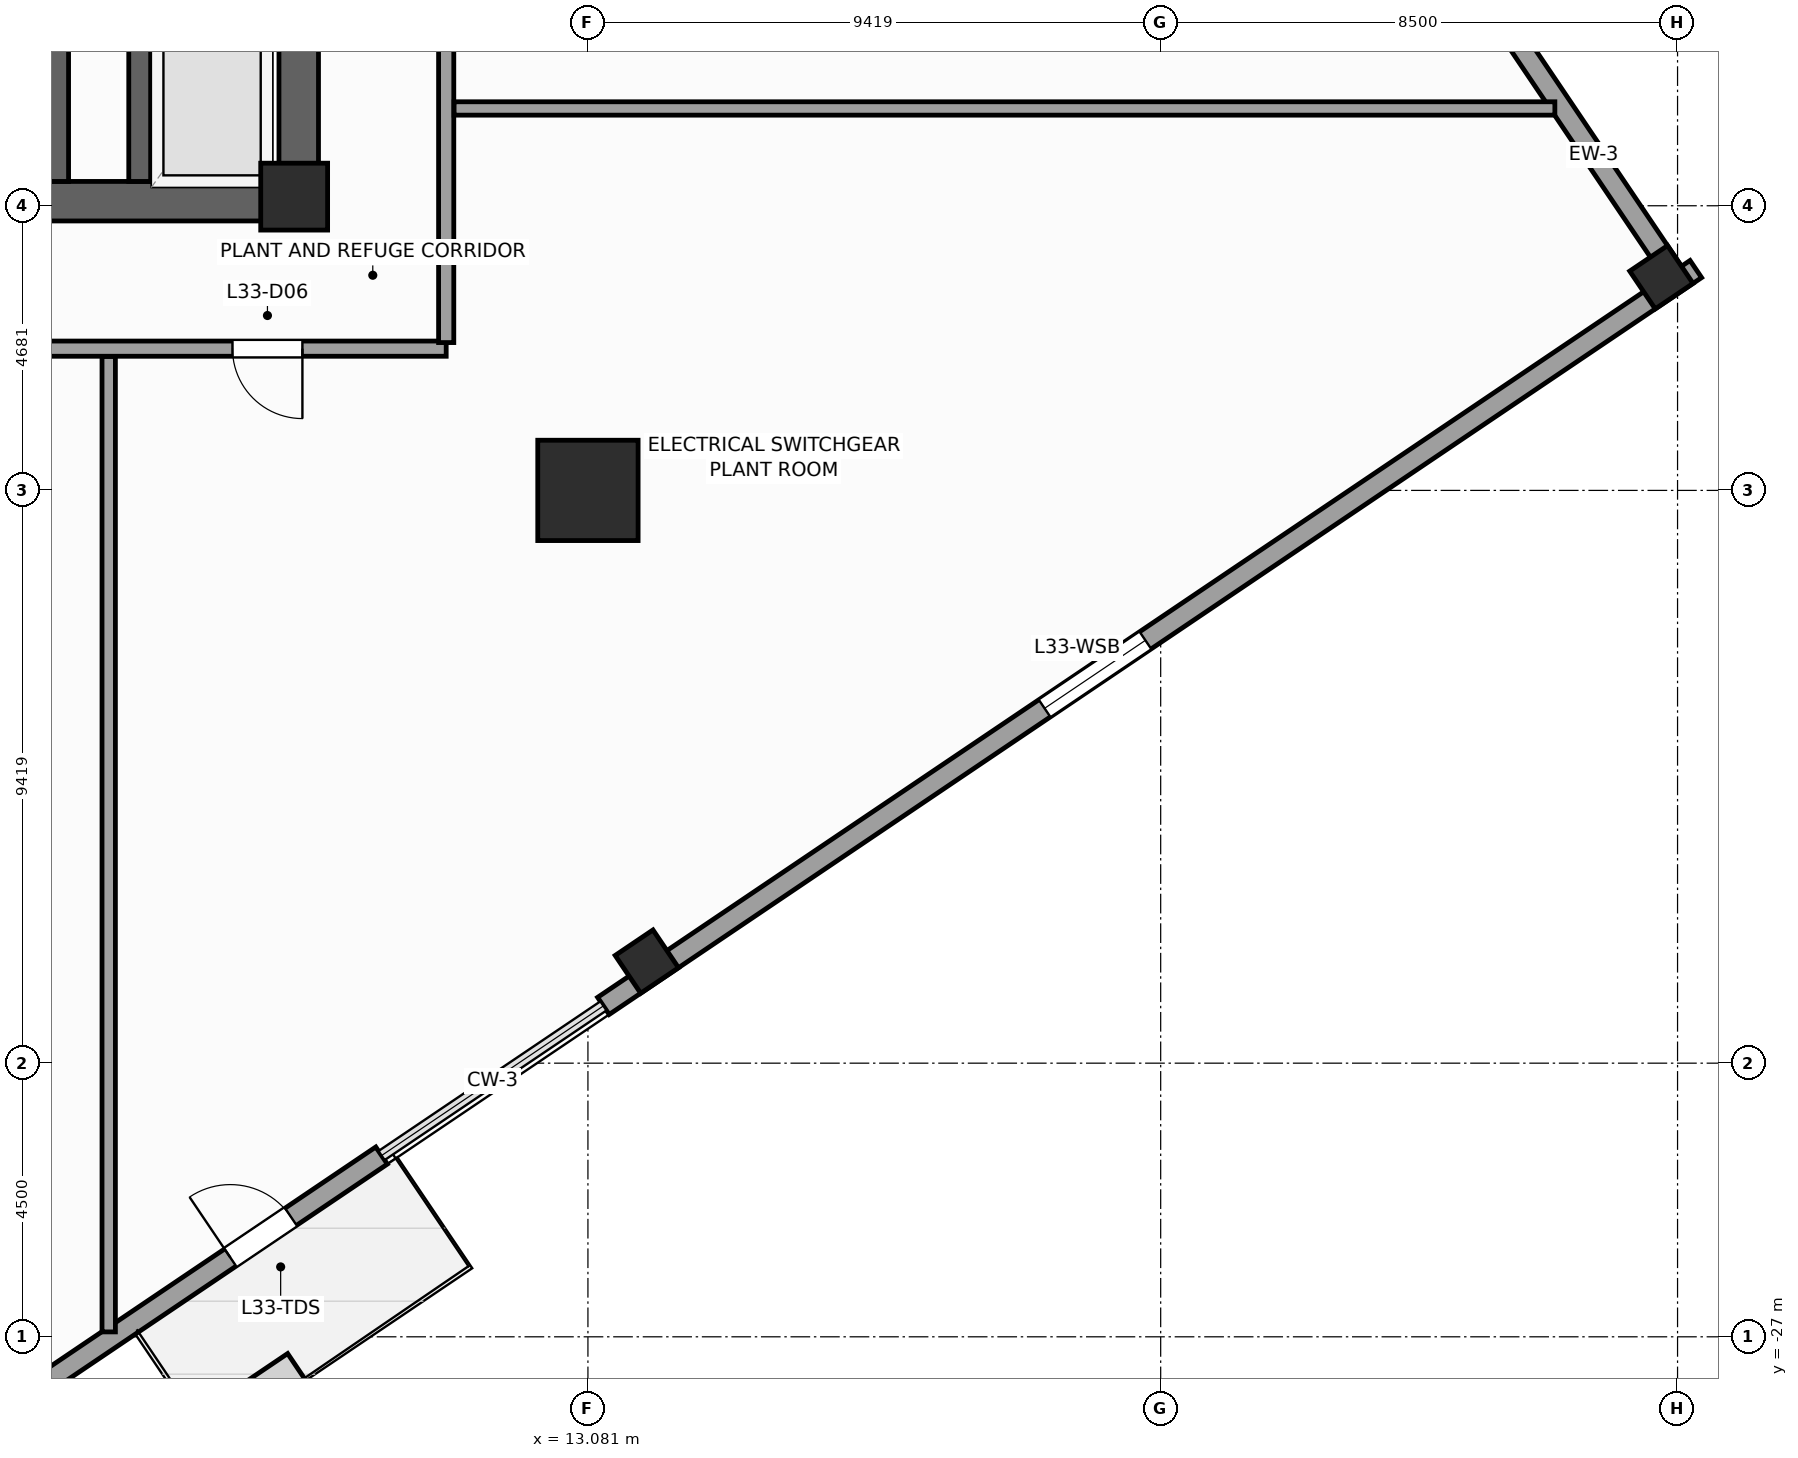
"""IFC4 building model, lengths in metres.
Left out: names, types, materials, properties, quantities, classifications, styles, units other than length and angle.
Written with IfcOpenShell. Run it as: python <this file> out.ifc"""

import sys

from ifc_helpers import new_model, si_unit, direction, frame, frame_2d, origin, origin_2d, place, context, subcontext, project, spatial, rectangle, extrude, source, transform, mapped, element, fill, save


model = new_model("IFC4")
c1 = context("Model", 3, precision=1e-05, world=origin(), true_north=direction((0.0, 1.0)))
c2 = subcontext(c1, "Body", "Model", "MODEL_VIEW")
j1 = project(units=[si_unit("LENGTHUNIT", "METRE"), si_unit("PLANEANGLEUNIT", "RADIAN")], contexts=[c1])
p1 = place(None, origin())
s1 = spatial("IfcSite", under=j1, at=p1, CompositionType="ELEMENT")
p2 = place(p1, origin())
s2 = spatial("IfcBuilding", under=s1, at=p2, CompositionType="ELEMENT")
p3 = place(p2, frame((0.0, 0.0, 139.2)))
s3 = spatial("IfcBuildingStorey", under=s2, at=p3, CompositionType="ELEMENT", Elevation=139.2)
p4 = place(p3, frame((-8.65, -8.325, 0.0), z_axis=(0.0, 0.0, 1.0), x_axis=(1.0, 0.0, 0.0)))
e1 = element("IfcWall", 1, at=p4, inside=s3, PredefinedType="SHEAR", context=c2, shape_type="SweptSolid", body=[
    extrude(rectangle(XDim=17.3, YDim=0.65, at=frame_2d((8.65, 0.0))), origin(), (0.0, 0.0, 1.0), 5.2),
])
p5 = place(p4, frame((8.0, 0.0, 0.0)))
e2 = element("IfcOpeningElement", 2, at=p5, cuts=e1, PredefinedType="OPENING", context=c2, shape_type="SweptSolid", body=[
    extrude(rectangle(XDim=1.3, YDim=2.2, at=frame_2d((0.65, 1.1))), frame((0.0, 0.335, 0.0), z_axis=(0.0, -1.0, 0.0), x_axis=(1.0, 0.0, 0.0)), (0.0, 0.0, 1.0), 0.67),
])
p6 = place(p3, frame((8.325, -8.0, 0.0), z_axis=(0.0, 0.0, 1.0), x_axis=(0.0, 1.0, 0.0)))
e3 = element("IfcWall", 3, at=p6, inside=s3, PredefinedType="SHEAR", context=c2, shape_type="SweptSolid", body=[
    extrude(rectangle(XDim=16.0, YDim=0.65, at=frame_2d((8.0, 0.0))), origin(), (0.0, 0.0, 1.0), 5.2),
])
p7 = place(p6, frame((4.69, 0.0, 0.0)))
e4 = element("IfcOpeningElement", 4, at=p7, cuts=e3, PredefinedType="OPENING", context=c2, shape_type="SweptSolid", body=[
    extrude(rectangle(XDim=1.3, YDim=2.2, at=frame_2d((0.65, 1.1))), frame((0.0, 0.335, 0.0), z_axis=(0.0, -1.0, 0.0), x_axis=(1.0, 0.0, 0.0)), (0.0, 0.0, 1.0), 0.67),
])
p8 = place(p3, frame((4.36, -8.0, 0.0), z_axis=(0.0, 0.0, 1.0), x_axis=(0.0, 1.0, 0.0)))
e5 = element("IfcWall", 5, at=p8, inside=s3, PredefinedType="SHEAR", context=c2, shape_type="SweptSolid", body=[
    extrude(rectangle(XDim=16.0, YDim=0.36, at=frame_2d((8.0, 0.0))), origin(), (0.0, 0.0, 1.0), 5.2),
])
p9 = place(p3, frame((5.71, -8.0, 0.0), z_axis=(0.0, 0.0, 1.0), x_axis=(0.0, 1.0, 0.0)))
e6 = element("IfcWall", 6, at=p9, inside=s3, PredefinedType="SHEAR", context=c2, shape_type="SweptSolid", body=[
    extrude(rectangle(XDim=2.54, YDim=0.36, at=frame_2d((1.27, 0.0))), origin(), (0.0, 0.0, 1.0), 5.2),
])
m1 = source(origin(), c2, "Body", "SweptSolid", [
    extrude(rectangle(XDim=1.1, YDim=1.1, at=origin_2d()), origin(), (0.0, 0.0, 1.0), 5.2),
])
p10 = place(p3, frame((8.25, -8.25, 0.0), z_axis=(0.0, 0.0, 1.0), x_axis=(1.0, 0.0, 0.0)))
e7 = element("IfcColumn", 7, at=p10, inside=s3, PredefinedType="PILASTER", context=c2, shape_type="MappedRepresentation", body=[
    mapped(m1, transform((0.0, 0.0, 0.0), scale=1.0)),
])
m2 = source(origin(), c2, "Body", "SweptSolid", [
    extrude(rectangle(XDim=1.65, YDim=1.65, at=origin_2d()), origin(), (0.0, 0.0, 1.0), 5.2),
])
p11 = place(p3, frame((13.081, -13.081, 0.0), z_axis=(0.0, 0.0, 1.0), x_axis=(1.0, 0.0, 0.0)))
e8 = element("IfcColumn", 8, at=p11, inside=s3, PredefinedType="COLUMN", context=c2, shape_type="MappedRepresentation", body=[
    mapped(m2, transform((0.0, 0.0, 0.0), scale=1.0)),
])
m3 = source(origin(), c2, "Body", "SweptSolid", [
    extrude(rectangle(XDim=0.75, YDim=0.75, at=origin_2d()), origin(), (0.0, 0.0, 1.0), 5.2),
])
for number, where, z_axis, x_axis in (
    (9, (14.05, -20.83, 0.0), (0.0, 0.0, 1.0), (0.829, 0.559, 0.0)),
    (10, (30.734, -9.576, 0.0), (0.0, 0.0, 1.0), (0.829, 0.559, 0.0)),
):
    element("IfcColumn", number, at=place(p3, frame(where, z_axis=z_axis, x_axis=x_axis)), inside=s3, PredefinedType="COLUMN", context=c2, shape_type="MappedRepresentation", body=[
        mapped(m3, transform((0.0, 0.0, 0.0), scale=1.0)),
    ])
p12 = place(p3, frame((31.019, -9.631, 0.0), z_axis=(0.0, 0.0, 1.0), x_axis=(-0.559210350234, 0.829025804298, 0.0)))
e11 = element("IfcWall", 11, at=p12, inside=s3, PredefinedType="STANDARD", context=c2, shape_type="SweptSolid", body=[
    extrude(rectangle(XDim=5.0, YDim=0.34, at=frame_2d((2.5, 0.0))), origin(), (0.0, 0.0, 1.0), 4.94),
])
p13 = place(p3, frame((-2.972, -32.558, 0.0), z_axis=(0.0, 0.0, 1.0), x_axis=(0.82903231094, 0.559200704056, 0.0)))
e12 = element("IfcWall", 12, at=p13, inside=s3, PredefinedType="STANDARD", context=c2, shape_type="SweptSolid", body=[
    extrude(rectangle(XDim=15.27, YDim=0.34, at=frame_2d((7.635, 0.0))), origin(), (0.0, 0.0, 1.0), 4.34),
])
p14 = place(p13, frame((12.27, 0.0, 0.0)))
e13 = element("IfcOpeningElement", 13, at=p14, cuts=e12, PredefinedType="OPENING", context=c2, shape_type="SweptSolid", body=[
    extrude(rectangle(XDim=1.2, YDim=2.3, at=frame_2d((0.6, 1.15))), frame((0.0, 0.18, 0.0), z_axis=(0.0, -1.0, 0.0), x_axis=(1.0, 0.0, 0.0)), (0.0, 0.0, 1.0), 0.36),
])
p15 = place(p3, frame((13.335, -21.559, 0.0), z_axis=(0.0, 0.0, 1.0), x_axis=(0.829039576702, 0.559189932189, 0.0)))
e14 = element("IfcWall", 14, at=p15, inside=s3, PredefinedType="STANDARD", context=c2, shape_type="SweptSolid", body=[
    extrude(rectangle(XDim=21.67, YDim=0.34, at=frame_2d((10.835, 0.0))), origin(), (0.0, 0.0, 1.0), 4.24),
])
p16 = place(p15, frame((8.751, 0.0, 0.65)))
e15 = element("IfcOpeningElement", 15, at=p16, cuts=e14, PredefinedType="OPENING", context=c2, shape_type="SweptSolid", body=[
    extrude(rectangle(XDim=2.0, YDim=1.45, at=frame_2d((1.0, 0.725))), frame((0.0, 0.18, 0.0), z_axis=(0.0, -1.0, 0.0), x_axis=(1.0, 0.0, 0.0)), (0.0, 0.0, 1.0), 0.36),
])
p17 = place(p3, frame((-10.75, -10.75, 0.0), z_axis=(0.0, 0.0, 1.0), x_axis=(1.0, 0.0, 0.0)))
e16 = element("IfcWall", 16, at=p17, inside=s3, PredefinedType="PARTITIONING", context=c2, shape_type="SweptSolid", body=[
    extrude(rectangle(XDim=21.5, YDim=0.25, at=frame_2d((10.75, 0.0))), origin(), (0.0, 0.0, 1.0), 4.94),
])
p18 = place(p17, frame((17.986, 0.0, 0.0)))
e17 = element("IfcOpeningElement", 17, at=p18, cuts=e16, PredefinedType="OPENING", context=c2, shape_type="SweptSolid", body=[
    extrude(rectangle(XDim=1.15, YDim=2.25, at=frame_2d((0.575, 1.125))), frame((0.0, 0.135, 0.0), z_axis=(0.0, -1.0, 0.0), x_axis=(1.0, 0.0, 0.0)), (0.0, 0.0, 1.0), 0.27),
])
p19 = place(p17, frame((12.775, 0.0, 0.0)))
e18 = element("IfcOpeningElement", 18, at=p19, cuts=e16, PredefinedType="OPENING", context=c2, shape_type="SweptSolid", body=[
    extrude(rectangle(XDim=1.15, YDim=2.25, at=frame_2d((0.575, 1.125))), frame((0.0, 0.135, 0.0), z_axis=(0.0, -1.0, 0.0), x_axis=(1.0, 0.0, 0.0)), (0.0, 0.0, 1.0), 0.27),
])
p20 = place(p17, frame((7.575, 0.0, 0.0)))
e19 = element("IfcOpeningElement", 19, at=p20, cuts=e16, PredefinedType="OPENING", context=c2, shape_type="SweptSolid", body=[
    extrude(rectangle(XDim=1.15, YDim=2.25, at=frame_2d((0.575, 1.125))), frame((0.0, 0.135, 0.0), z_axis=(0.0, -1.0, 0.0), x_axis=(1.0, 0.0, 0.0)), (0.0, 0.0, 1.0), 0.27),
])
p21 = place(p17, frame((2.365, 0.0, 0.0)))
e20 = element("IfcOpeningElement", 20, at=p21, cuts=e16, PredefinedType="OPENING", context=c2, shape_type="SweptSolid", body=[
    extrude(rectangle(XDim=1.15, YDim=2.25, at=frame_2d((0.575, 1.125))), frame((0.0, 0.135, 0.0), z_axis=(0.0, -1.0, 0.0), x_axis=(1.0, 0.0, 0.0)), (0.0, 0.0, 1.0), 0.27),
])
p22 = place(p3, frame((10.75, -10.65, 0.0), z_axis=(0.0, 0.0, 1.0), x_axis=(0.0, 1.0, 0.0)))
e21 = element("IfcWall", 21, at=p22, inside=s3, PredefinedType="PARTITIONING", context=c2, shape_type="SweptSolid", body=[
    extrude(rectangle(XDim=21.3, YDim=0.25, at=frame_2d((10.65, 0.0))), origin(), (0.0, 0.0, 1.0), 4.94),
])
p23 = place(p22, frame((11.35, 0.0, 0.0)))
e22 = element("IfcOpeningElement", 22, at=p23, cuts=e21, PredefinedType="OPENING", context=c2, shape_type="SweptSolid", body=[
    extrude(rectangle(XDim=1.15, YDim=2.25, at=frame_2d((0.575, 1.125))), frame((0.0, 0.135, 0.0), z_axis=(0.0, -1.0, 0.0), x_axis=(1.0, 0.0, 0.0)), (0.0, 0.0, 1.0), 0.27),
])
p24 = place(p3, frame((10.88, -6.8, 0.0), z_axis=(0.0, 0.0, 1.0), x_axis=(1.0, 0.0, 0.0)))
e23 = element("IfcWall", 23, at=p24, inside=s3, PredefinedType="PARTITIONING", context=c2, shape_type="SweptSolid", body=[
    extrude(rectangle(XDim=18.103, YDim=0.22, at=frame_2d((9.051, 0.0))), origin(), (0.0, 0.0, 1.0), 4.94),
])
p25 = place(p3, frame((5.2, -10.88, 0.0), z_axis=(0.0, 0.0, 1.0), x_axis=(0.0, -1.0, 0.0)))
e24 = element("IfcWall", 24, at=p25, inside=s3, PredefinedType="PARTITIONING", context=c2, shape_type="SweptSolid", body=[
    extrude(rectangle(XDim=16.04, YDim=0.22, at=frame_2d((8.02, 0.0))), origin(), (0.0, 0.0, 1.0), 4.94),
])
m4 = source(origin(), c2, "Body", "SweptSolid", [
    extrude(rectangle(XDim=2.0, YDim=1.45, at=frame_2d((1.0, 0.725))), frame((0.0, 0.03, 0.0), z_axis=(0.0, -1.0, 0.0), x_axis=(1.0, 0.0, 0.0)), (0.0, 0.0, 1.0), 0.06),
])
p26 = place(p16, origin())
e25 = element("IfcWindow", 25, at=p26, inside=s3, PartitioningType="SINGLE_PANEL", PredefinedType="WINDOW", context=c2, shape_type="MappedRepresentation", body=[
    mapped(m4, transform((0.0, 0.0, 0.0), scale=1.0)),
])
fill(e15, e25)
m5 = source(origin(), c2, "Body", "SweptSolid", [
    extrude(rectangle(XDim=1.2, YDim=2.3, at=frame_2d((0.6, 1.15))), frame((0.0, 0.025, 0.0), z_axis=(0.0, -1.0, 0.0), x_axis=(1.0, 0.0, 0.0)), (0.0, 0.0, 1.0), 0.05),
])
p27 = place(p14, origin())
e26 = element("IfcDoor", 26, at=p27, inside=s3, OperationType="SINGLE_SWING_LEFT", PredefinedType="DOOR", context=c2, shape_type="MappedRepresentation", body=[
    mapped(m5, transform((0.0, 0.0, 0.0), scale=1.0)),
])
fill(e13, e26)
m6 = source(origin(), c2, "Body", "SweptSolid", [
    extrude(rectangle(XDim=1.15, YDim=2.25, at=frame_2d((0.575, 1.125))), frame((0.0, 0.025, 0.0), z_axis=(0.0, -1.0, 0.0), x_axis=(1.0, 0.0, 0.0)), (0.0, 0.0, 1.0), 0.05),
])
p28 = place(p18, frame((1.15, 0.0, 0.0), z_axis=(0.0, 0.0, 1.0), x_axis=(-1.0, 0.0, 0.0)))
e27 = element("IfcDoor", 27, at=p28, inside=s3, OperationType="SINGLE_SWING_RIGHT", PredefinedType="DOOR", context=c2, shape_type="MappedRepresentation", body=[
    mapped(m6, transform((0.0, 0.0, 0.0), scale=1.0)),
])
fill(e17, e27)
save(model, sys.argv[1])
